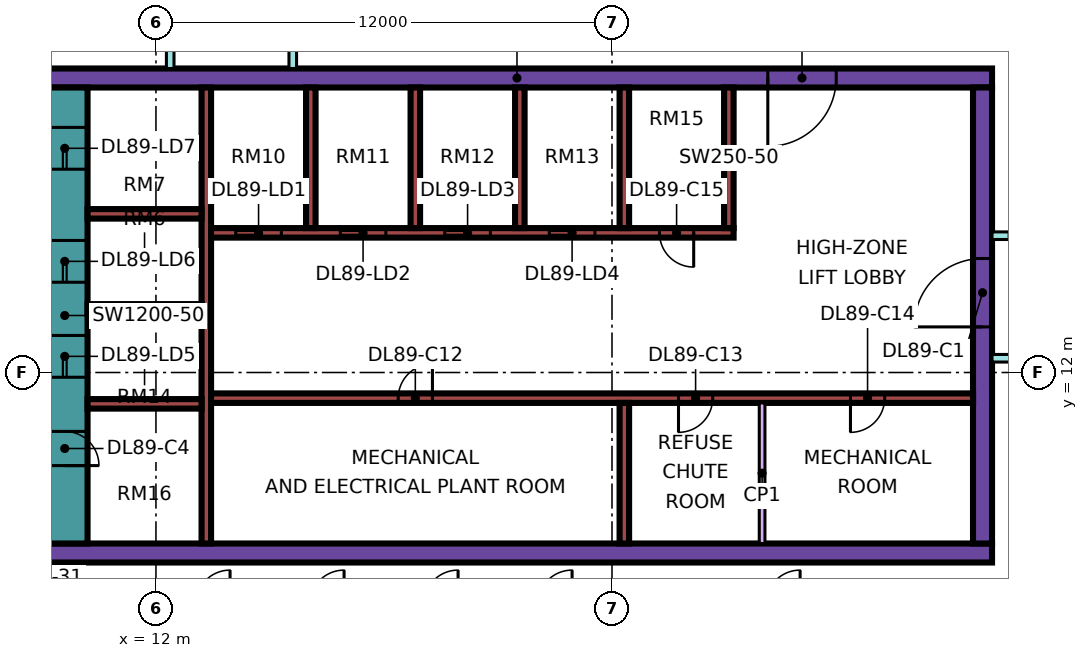
"""IFC4 building model, lengths in metres.
Left out: names, types, materials, properties, quantities, classifications, styles, units other than length and angle.
Written with IfcOpenShell. Run it as: python <this file> out.ifc"""

import sys

from ifc_helpers import new_model, si_unit, direction, frame, frame_2d, origin, place, context, subcontext, project, spatial, rectangle, extrude, element, fill, save


model = new_model("IFC4")
c1 = context("Model", 3, precision=1e-05, world=origin(), true_north=direction((0.0, 1.0)))
c2 = subcontext(c1, "Body", "Model", "MODEL_VIEW")
j1 = project(units=[si_unit("LENGTHUNIT", "METRE"), si_unit("PLANEANGLEUNIT", "RADIAN")], contexts=[c1])
p1 = place(None, origin())
s1 = spatial("IfcSite", under=j1, at=p1, CompositionType="ELEMENT")
p2 = place(p1, origin())
s2 = spatial("IfcBuilding", under=s1, at=p2, CompositionType="ELEMENT")
p3 = place(p2, frame((0.0, 0.0, 380.15)))
s3 = spatial("IfcBuildingStorey", under=s2, at=p3, CompositionType="ELEMENT", Elevation=380.15)
p4 = place(p3, frame((9.0, 7.25, 0.0), z_axis=(0.0, 0.0, 1.0), x_axis=(1.0, 0.0, 0.0)))
e1 = element("IfcWall", 1, at=p4, inside=s3, PredefinedType="SHEAR", context=c2, shape_type="SweptSolid", body=[
    extrude(rectangle(XDim=25.0, YDim=0.5, at=frame_2d((12.5, 0.0))), origin(), (0.0, 0.0, 1.0), 3.75),
])
p5 = place(p3, frame((9.0, 19.75, 0.0), z_axis=(0.0, 0.0, 1.0), x_axis=(1.0, 0.0, 0.0)))
e2 = element("IfcWall", 2, at=p5, inside=s3, PredefinedType="SHEAR", context=c2, shape_type="SweptSolid", body=[
    extrude(rectangle(XDim=25.0, YDim=0.5, at=frame_2d((12.5, 0.0))), origin(), (0.0, 0.0, 1.0), 3.75),
])
p6 = place(p5, frame((19.1, 0.0, 0.0)))
e3 = element("IfcOpeningElement", 3, at=p6, cuts=e2, PredefinedType="OPENING", context=c2, shape_type="SweptSolid", body=[
    extrude(rectangle(XDim=1.8, YDim=2.4, at=frame_2d((0.9, 1.2))), frame((0.0, 0.26, 0.0), z_axis=(0.0, -1.0, 0.0), x_axis=(1.0, 0.0, 0.0)), (0.0, 0.0, 1.0), 0.52),
])
p7 = place(p3, frame((9.6, 7.5, 0.0), z_axis=(0.0, 0.0, 1.0), x_axis=(0.0, 1.0, 0.0)))
e4 = element("IfcWall", 4, at=p7, inside=s3, PredefinedType="SHEAR", context=c2, shape_type="SweptSolid", body=[
    extrude(rectangle(XDim=12.0, YDim=1.2, at=frame_2d((6.0, 0.0))), origin(), (0.0, 0.0, 1.0), 3.75),
])
p8 = place(p7, frame((4.375, 0.0, 0.0)))
e5 = element("IfcOpeningElement", 5, at=p8, cuts=e4, PredefinedType="OPENING", context=c2, shape_type="SweptSolid", body=[
    extrude(rectangle(XDim=1.1, YDim=2.2, at=frame_2d((0.55, 1.1))), frame((0.0, 0.61, 0.0), z_axis=(0.0, -1.0, 0.0), x_axis=(1.0, 0.0, 0.0)), (0.0, 0.0, 1.0), 1.22),
])
p9 = place(p7, frame((6.875, 0.0, 0.0)))
e6 = element("IfcOpeningElement", 6, at=p9, cuts=e4, PredefinedType="OPENING", context=c2, shape_type="SweptSolid", body=[
    extrude(rectangle(XDim=1.1, YDim=2.2, at=frame_2d((0.55, 1.1))), frame((0.0, 0.61, 0.0), z_axis=(0.0, -1.0, 0.0), x_axis=(1.0, 0.0, 0.0)), (0.0, 0.0, 1.0), 1.22),
])
p10 = place(p7, frame((9.85, 0.0, 0.0)))
e7 = element("IfcOpeningElement", 7, at=p10, cuts=e4, PredefinedType="OPENING", context=c2, shape_type="SweptSolid", body=[
    extrude(rectangle(XDim=1.1, YDim=2.2, at=frame_2d((0.55, 1.1))), frame((0.0, 0.61, 0.0), z_axis=(0.0, -1.0, 0.0), x_axis=(1.0, 0.0, 0.0)), (0.0, 0.0, 1.0), 1.22),
])
p11 = place(p7, frame((2.05, 0.0, 0.0)))
e8 = element("IfcOpeningElement", 8, at=p11, cuts=e4, PredefinedType="OPENING", context=c2, shape_type="SweptSolid", body=[
    extrude(rectangle(XDim=0.9, YDim=2.1, at=frame_2d((0.45, 1.05))), frame((0.0, 0.61, 0.0), z_axis=(0.0, -1.0, 0.0), x_axis=(1.0, 0.0, 0.0)), (0.0, 0.0, 1.0), 1.22),
])
p12 = place(p3, frame((33.75, 7.5, 0.0), z_axis=(0.0, 0.0, 1.0), x_axis=(0.0, 1.0, 0.0)))
e9 = element("IfcWall", 9, at=p12, inside=s3, PredefinedType="SHEAR", context=c2, shape_type="SweptSolid", body=[
    extrude(rectangle(XDim=12.0, YDim=0.5, at=frame_2d((6.0, 0.0))), origin(), (0.0, 0.0, 1.0), 3.75),
])
p13 = place(p12, frame((5.7, 0.0, 0.0)))
e10 = element("IfcOpeningElement", 10, at=p13, cuts=e9, PredefinedType="OPENING", context=c2, shape_type="SweptSolid", body=[
    extrude(rectangle(XDim=1.8, YDim=2.4, at=frame_2d((0.9, 1.2))), frame((0.0, 0.26, 0.0), z_axis=(0.0, -1.0, 0.0), x_axis=(1.0, 0.0, 0.0)), (0.0, 0.0, 1.0), 0.52),
])
p14 = place(p3, frame((13.325, 7.5, 0.0), z_axis=(0.0, 0.0, 1.0), x_axis=(0.0, 1.0, 0.0)))
e11 = element("IfcWall", 11, at=p14, inside=s3, PredefinedType="SHEAR", context=c2, shape_type="SweptSolid", body=[
    extrude(rectangle(XDim=12.0, YDim=0.25, at=frame_2d((6.0, 0.0))), origin(), (0.0, 0.0, 1.0), 3.75),
])
p15 = place(p3, frame((13.45, 11.325, 0.0), z_axis=(0.0, 0.0, 1.0), x_axis=(1.0, 0.0, 0.0)))
e12 = element("IfcWall", 12, at=p15, inside=s3, PredefinedType="SHEAR", context=c2, shape_type="SweptSolid", body=[
    extrude(rectangle(XDim=20.05, YDim=0.25, at=frame_2d((10.025, 0.0))), origin(), (0.0, 0.0, 1.0), 3.75),
])
p16 = place(p15, frame((4.925, 0.0, 0.0)))
e13 = element("IfcOpeningElement", 13, at=p16, cuts=e12, PredefinedType="OPENING", context=c2, shape_type="SweptSolid", body=[
    extrude(rectangle(XDim=0.9, YDim=2.1, at=frame_2d((0.45, 1.05))), frame((0.0, 0.135, 0.0), z_axis=(0.0, -1.0, 0.0), x_axis=(1.0, 0.0, 0.0)), (0.0, 0.0, 1.0), 0.27),
])
p17 = place(p15, frame((12.3, 0.0, 0.0)))
e14 = element("IfcOpeningElement", 14, at=p17, cuts=e12, PredefinedType="OPENING", context=c2, shape_type="SweptSolid", body=[
    extrude(rectangle(XDim=0.9, YDim=2.1, at=frame_2d((0.45, 1.05))), frame((0.0, 0.135, 0.0), z_axis=(0.0, -1.0, 0.0), x_axis=(1.0, 0.0, 0.0)), (0.0, 0.0, 1.0), 0.27),
])
p18 = place(p15, frame((16.825, 0.0, 0.0)))
e15 = element("IfcOpeningElement", 15, at=p18, cuts=e12, PredefinedType="OPENING", context=c2, shape_type="SweptSolid", body=[
    extrude(rectangle(XDim=0.9, YDim=2.1, at=frame_2d((0.45, 1.05))), frame((0.0, 0.135, 0.0), z_axis=(0.0, -1.0, 0.0), x_axis=(1.0, 0.0, 0.0)), (0.0, 0.0, 1.0), 0.27),
])
p19 = place(p3, frame((13.45, 15.675, 0.0), z_axis=(0.0, 0.0, 1.0), x_axis=(1.0, 0.0, 0.0)))
e16 = element("IfcWall", 16, at=p19, inside=s3, PredefinedType="SHEAR", context=c2, shape_type="SweptSolid", body=[
    extrude(rectangle(XDim=13.75, YDim=0.25, at=frame_2d((6.875, 0.0))), origin(), (0.0, 0.0, 1.0), 3.75),
])
p20 = place(p19, frame((0.65, 0.0, 0.0)))
e17 = element("IfcOpeningElement", 17, at=p20, cuts=e16, PredefinedType="OPENING", context=c2, shape_type="SweptSolid", body=[
    extrude(rectangle(XDim=1.2, YDim=2.2, at=frame_2d((0.6, 1.1))), frame((0.0, 0.135, 0.0), z_axis=(0.0, -1.0, 0.0), x_axis=(1.0, 0.0, 0.0)), (0.0, 0.0, 1.0), 0.27),
])
p21 = place(p19, frame((3.4, 0.0, 0.0)))
e18 = element("IfcOpeningElement", 18, at=p21, cuts=e16, PredefinedType="OPENING", context=c2, shape_type="SweptSolid", body=[
    extrude(rectangle(XDim=1.2, YDim=2.2, at=frame_2d((0.6, 1.1))), frame((0.0, 0.135, 0.0), z_axis=(0.0, -1.0, 0.0), x_axis=(1.0, 0.0, 0.0)), (0.0, 0.0, 1.0), 0.27),
])
p22 = place(p19, frame((6.15, 0.0, 0.0)))
e19 = element("IfcOpeningElement", 19, at=p22, cuts=e16, PredefinedType="OPENING", context=c2, shape_type="SweptSolid", body=[
    extrude(rectangle(XDim=1.2, YDim=2.2, at=frame_2d((0.6, 1.1))), frame((0.0, 0.135, 0.0), z_axis=(0.0, -1.0, 0.0), x_axis=(1.0, 0.0, 0.0)), (0.0, 0.0, 1.0), 0.27),
])
p23 = place(p19, frame((8.9, 0.0, 0.0)))
e20 = element("IfcOpeningElement", 20, at=p23, cuts=e16, PredefinedType="OPENING", context=c2, shape_type="SweptSolid", body=[
    extrude(rectangle(XDim=1.2, YDim=2.2, at=frame_2d((0.6, 1.1))), frame((0.0, 0.135, 0.0), z_axis=(0.0, -1.0, 0.0), x_axis=(1.0, 0.0, 0.0)), (0.0, 0.0, 1.0), 0.27),
])
p24 = place(p19, frame((11.8, 0.0, 0.0)))
e21 = element("IfcOpeningElement", 21, at=p24, cuts=e16, PredefinedType="OPENING", context=c2, shape_type="SweptSolid", body=[
    extrude(rectangle(XDim=0.9, YDim=2.1, at=frame_2d((0.45, 1.05))), frame((0.0, 0.135, 0.0), z_axis=(0.0, -1.0, 0.0), x_axis=(1.0, 0.0, 0.0)), (0.0, 0.0, 1.0), 0.27),
])
for number, where, z_axis, x_axis in (
    (22, (10.2, 11.175, 0.0), (0.0, 0.0, 1.0), (1.0, 0.0, 0.0)),
    (23, (10.2, 13.675, 0.0), (0.0, 0.0, 1.0), (1.0, 0.0, 0.0)),
    (24, (10.2, 16.175, 0.0), (0.0, 0.0, 1.0), (1.0, 0.0, 0.0)),
):
    element("IfcWall", number, at=place(p3, frame(where, z_axis=z_axis, x_axis=x_axis)), inside=s3, PredefinedType="SHEAR", context=c2, shape_type="SweptSolid", body=[
        extrude(rectangle(XDim=3.0, YDim=0.25, at=frame_2d((1.5, 0.0))), origin(), (0.0, 0.0, 1.0), 3.75),
    ])
for number, where, z_axis, x_axis in (
    (25, (24.325, 7.5, 0.0), (0.0, 0.0, 1.0), (0.0, 1.0, 0.0)),
    (26, (16.075, 15.8, 0.0), (0.0, 0.0, 1.0), (0.0, 1.0, 0.0)),
    (27, (18.825, 15.8, 0.0), (0.0, 0.0, 1.0), (0.0, 1.0, 0.0)),
    (28, (21.575, 15.8, 0.0), (0.0, 0.0, 1.0), (0.0, 1.0, 0.0)),
    (29, (24.325, 15.8, 0.0), (0.0, 0.0, 1.0), (0.0, 1.0, 0.0)),
    (30, (27.075, 15.8, 0.0), (0.0, 0.0, 1.0), (0.0, 1.0, 0.0)),
):
    element("IfcWall", number, at=place(p3, frame(where, z_axis=z_axis, x_axis=x_axis)), inside=s3, PredefinedType="SHEAR", context=c2, shape_type="SweptSolid", body=[
        extrude(rectangle(XDim=3.7, YDim=0.25, at=frame_2d((1.85, 0.0))), origin(), (0.0, 0.0, 1.0), 3.75),
    ])
p25 = place(p3, frame((-1.447, 12.553, 0.0), z_axis=(0.0, 0.0, 1.0), x_axis=(0.707106781187, -0.707106781187, 0.0)))
e31 = element("IfcWall", 31, at=p25, inside=s3, PredefinedType="SOLIDWALL", context=c2, shape_type="SweptSolid", body=[
    extrude(rectangle(XDim=19.799, YDim=0.15, at=frame_2d((9.899, 0.0))), origin(), (0.0, 0.0, 1.0), 3.3),
])
p26 = place(p25, frame((2.212, 0.0, 0.45)))
e32 = element("IfcOpeningElement", 32, at=p26, cuts=e31, PredefinedType="OPENING", context=c2, shape_type="SweptSolid", body=[
    extrude(rectangle(XDim=3.0, YDim=2.0, at=frame_2d((1.5, 1.0))), frame((0.0, 0.085, 0.0), z_axis=(0.0, -1.0, 0.0), x_axis=(1.0, 0.0, 0.0)), (0.0, 0.0, 1.0), 0.17),
])
p27 = place(p25, frame((10.216, 0.0, 0.45)))
e33 = element("IfcOpeningElement", 33, at=p27, cuts=e31, PredefinedType="OPENING", context=c2, shape_type="SweptSolid", body=[
    extrude(rectangle(XDim=3.0, YDim=2.0, at=frame_2d((1.5, 1.0))), frame((0.0, 0.085, 0.0), z_axis=(0.0, -1.0, 0.0), x_axis=(1.0, 0.0, 0.0)), (0.0, 0.0, 1.0), 0.17),
])
p28 = place(p3, frame((27.95, 7.5, 0.0), z_axis=(0.0, 0.0, 1.0), x_axis=(0.0, 1.0, 0.0)))
e34 = element("IfcWall", 34, at=p28, inside=s3, PredefinedType="PARTITIONING", context=c2, shape_type="SweptSolid", body=[
    extrude(rectangle(XDim=3.7, YDim=0.15, at=frame_2d((1.85, 0.0))), origin(), (0.0, 0.0, 1.0), 3.3),
])
p29 = place(p3, frame((15.6, 20.0, 0.0), z_axis=(0.0, 0.0, 1.0), x_axis=(0.0, 1.0, 0.0)))
e35 = element("IfcWall", 35, at=p29, inside=s3, PredefinedType="PARTITIONING", context=c2, shape_type="SweptSolid", body=[
    extrude(rectangle(XDim=27.775, YDim=0.2, at=frame_2d((13.887, 0.0))), origin(), (0.0, 0.0, 1.0), 3.3),
])
p30 = place(p29, frame((7.15, 0.0, 0.0)))
e36 = element("IfcOpeningElement", 36, at=p30, cuts=e35, PredefinedType="OPENING", context=c2, shape_type="SweptSolid", body=[
    extrude(rectangle(XDim=1.6, YDim=2.1, at=frame_2d((0.8, 1.05))), frame((0.0, 0.11, 0.0), z_axis=(0.0, -1.0, 0.0), x_axis=(1.0, 0.0, 0.0)), (0.0, 0.0, 1.0), 0.22),
])
p31 = place(p29, frame((13.5, 0.0, 0.0)))
e37 = element("IfcOpeningElement", 37, at=p31, cuts=e35, PredefinedType="OPENING", context=c2, shape_type="SweptSolid", body=[
    extrude(rectangle(XDim=1.0, YDim=2.1, at=frame_2d((0.5, 1.05))), frame((0.0, 0.11, 0.0), z_axis=(0.0, -1.0, 0.0), x_axis=(1.0, 0.0, 0.0)), (0.0, 0.0, 1.0), 0.22),
])
p32 = place(p29, frame((22.9, 0.0, 0.0)))
e38 = element("IfcOpeningElement", 38, at=p32, cuts=e35, PredefinedType="OPENING", context=c2, shape_type="SweptSolid", body=[
    extrude(rectangle(XDim=1.0, YDim=2.1, at=frame_2d((0.5, 1.05))), frame((0.0, 0.11, 0.0), z_axis=(0.0, -1.0, 0.0), x_axis=(1.0, 0.0, 0.0)), (0.0, 0.0, 1.0), 0.22),
])
p33 = place(p29, frame((1.15, 0.0, 0.0)))
e39 = element("IfcOpeningElement", 39, at=p33, cuts=e35, PredefinedType="OPENING", context=c2, shape_type="SweptSolid", body=[
    extrude(rectangle(XDim=1.8, YDim=2.1, at=frame_2d((0.9, 1.05))), frame((0.0, 0.11, 0.0), z_axis=(0.0, -1.0, 0.0), x_axis=(1.0, 0.0, 0.0)), (0.0, 0.0, 1.0), 0.22),
])
p34 = place(p29, frame((25.9, 0.0, 0.0)))
e40 = element("IfcOpeningElement", 40, at=p34, cuts=e35, PredefinedType="OPENING", context=c2, shape_type="SweptSolid", body=[
    extrude(rectangle(XDim=1.0, YDim=2.1, at=frame_2d((0.5, 1.05))), frame((0.0, 0.11, 0.0), z_axis=(0.0, -1.0, 0.0), x_axis=(1.0, 0.0, 0.0)), (0.0, 0.0, 1.0), 0.22),
])
p35 = place(p3, frame((34.0, 12.375, 0.0), z_axis=(0.0, 0.0, 1.0), x_axis=(1.0, 0.0, 0.0)))
e41 = element("IfcWall", 41, at=p35, inside=s3, PredefinedType="PARTITIONING", context=c2, shape_type="SweptSolid", body=[
    extrude(rectangle(XDim=2.376, YDim=0.2, at=frame_2d((1.188, 0.0))), origin(), (0.0, 0.0, 1.0), 3.3),
])
p36 = place(p3, frame((34.0, 15.6, 0.0), z_axis=(0.0, 0.0, 1.0), x_axis=(1.0, 0.0, 0.0)))
e42 = element("IfcWall", 42, at=p36, inside=s3, PredefinedType="PARTITIONING", context=c2, shape_type="SweptSolid", body=[
    extrude(rectangle(XDim=10.35, YDim=0.2, at=frame_2d((5.175, 0.0))), origin(), (0.0, 0.0, 1.0), 3.3),
])
p37 = place(p36, frame((5.6, 0.0, 0.0)))
e43 = element("IfcOpeningElement", 43, at=p37, cuts=e42, PredefinedType="OPENING", context=c2, shape_type="SweptSolid", body=[
    extrude(rectangle(XDim=1.0, YDim=2.1, at=frame_2d((0.5, 1.05))), frame((0.0, 0.11, 0.0), z_axis=(0.0, -1.0, 0.0), x_axis=(1.0, 0.0, 0.0)), (0.0, 0.0, 1.0), 0.22),
])
p38 = place(p36, frame((0.45, 0.0, 0.0)))
e44 = element("IfcOpeningElement", 44, at=p38, cuts=e42, PredefinedType="OPENING", context=c2, shape_type="SweptSolid", body=[
    extrude(rectangle(XDim=1.2, YDim=2.1, at=frame_2d((0.6, 1.05))), frame((0.0, 0.11, 0.0), z_axis=(0.0, -1.0, 0.0), x_axis=(1.0, 0.0, 0.0)), (0.0, 0.0, 1.0), 0.22),
])
p39 = place(p3, frame((12.375, 20.0, 0.0), z_axis=(0.0, 0.0, 1.0), x_axis=(0.0, 1.0, 0.0)))
e45 = element("IfcWall", 45, at=p39, inside=s3, PredefinedType="PARTITIONING", context=c2, shape_type="SweptSolid", body=[
    extrude(rectangle(XDim=4.375, YDim=0.2, at=frame_2d((2.188, 0.0))), origin(), (0.0, 0.0, 1.0), 3.3),
])
p40 = place(p39, frame((0.6, 0.0, 0.0)))
e46 = element("IfcOpeningElement", 46, at=p40, cuts=e45, PredefinedType="OPENING", context=c2, shape_type="SweptSolid", body=[
    extrude(rectangle(XDim=1.2, YDim=2.1, at=frame_2d((0.6, 1.05))), frame((0.0, 0.11, 0.0), z_axis=(0.0, -1.0, 0.0), x_axis=(1.0, 0.0, 0.0)), (0.0, 0.0, 1.0), 0.22),
])
p41 = place(p20, origin())
e47 = element("IfcDoor", 47, at=p41, inside=s3, OperationType="DOUBLE_DOOR_SLIDING", PredefinedType="DOOR", context=c2, shape_type="SweptSolid", body=[
    extrude(rectangle(XDim=1.2, YDim=2.2, at=frame_2d((0.6, 1.1))), frame((0.0, 0.025, 0.0), z_axis=(0.0, -1.0, 0.0), x_axis=(1.0, 0.0, 0.0)), (0.0, 0.0, 1.0), 0.05),
])
fill(e17, e47)
p42 = place(p21, origin())
e48 = element("IfcDoor", 48, at=p42, inside=s3, OperationType="DOUBLE_DOOR_SLIDING", PredefinedType="DOOR", context=c2, shape_type="SweptSolid", body=[
    extrude(rectangle(XDim=1.2, YDim=2.2, at=frame_2d((0.6, 1.1))), frame((0.0, 0.025, 0.0), z_axis=(0.0, -1.0, 0.0), x_axis=(1.0, 0.0, 0.0)), (0.0, 0.0, 1.0), 0.05),
])
fill(e18, e48)
p43 = place(p22, origin())
e49 = element("IfcDoor", 49, at=p43, inside=s3, OperationType="DOUBLE_DOOR_SLIDING", PredefinedType="DOOR", context=c2, shape_type="SweptSolid", body=[
    extrude(rectangle(XDim=1.2, YDim=2.2, at=frame_2d((0.6, 1.1))), frame((0.0, 0.025, 0.0), z_axis=(0.0, -1.0, 0.0), x_axis=(1.0, 0.0, 0.0)), (0.0, 0.0, 1.0), 0.05),
])
fill(e19, e49)
p44 = place(p23, origin())
e50 = element("IfcDoor", 50, at=p44, inside=s3, OperationType="DOUBLE_DOOR_SLIDING", PredefinedType="DOOR", context=c2, shape_type="SweptSolid", body=[
    extrude(rectangle(XDim=1.2, YDim=2.2, at=frame_2d((0.6, 1.1))), frame((0.0, 0.025, 0.0), z_axis=(0.0, -1.0, 0.0), x_axis=(1.0, 0.0, 0.0)), (0.0, 0.0, 1.0), 0.05),
])
fill(e20, e50)
p45 = place(p8, origin())
e51 = element("IfcDoor", 51, at=p45, inside=s3, OperationType="DOUBLE_DOOR_SLIDING", PredefinedType="DOOR", context=c2, shape_type="SweptSolid", body=[
    extrude(rectangle(XDim=1.1, YDim=2.2, at=frame_2d((0.55, 1.1))), frame((0.0, 0.025, 0.0), z_axis=(0.0, -1.0, 0.0), x_axis=(1.0, 0.0, 0.0)), (0.0, 0.0, 1.0), 0.05),
])
fill(e5, e51)
p46 = place(p9, origin())
e52 = element("IfcDoor", 52, at=p46, inside=s3, OperationType="DOUBLE_DOOR_SLIDING", PredefinedType="DOOR", context=c2, shape_type="SweptSolid", body=[
    extrude(rectangle(XDim=1.1, YDim=2.2, at=frame_2d((0.55, 1.1))), frame((0.0, 0.025, 0.0), z_axis=(0.0, -1.0, 0.0), x_axis=(1.0, 0.0, 0.0)), (0.0, 0.0, 1.0), 0.05),
])
fill(e6, e52)
p47 = place(p10, origin())
e53 = element("IfcDoor", 53, at=p47, inside=s3, OperationType="DOUBLE_DOOR_SLIDING", PredefinedType="DOOR", context=c2, shape_type="SweptSolid", body=[
    extrude(rectangle(XDim=1.1, YDim=2.2, at=frame_2d((0.55, 1.1))), frame((0.0, 0.025, 0.0), z_axis=(0.0, -1.0, 0.0), x_axis=(1.0, 0.0, 0.0)), (0.0, 0.0, 1.0), 0.05),
])
fill(e7, e53)
p48 = place(p13, origin())
e54 = element("IfcDoor", 54, at=p48, inside=s3, OperationType="DOUBLE_DOOR_SINGLE_SWING", PredefinedType="DOOR", context=c2, shape_type="SweptSolid", body=[
    extrude(rectangle(XDim=1.8, YDim=2.4, at=frame_2d((0.9, 1.2))), frame((0.0, 0.025, 0.0), z_axis=(0.0, -1.0, 0.0), x_axis=(1.0, 0.0, 0.0)), (0.0, 0.0, 1.0), 0.05),
])
fill(e10, e54)
p49 = place(p6, frame((1.8, 0.0, 0.0), z_axis=(0.0, 0.0, 1.0), x_axis=(-1.0, 0.0, 0.0)))
e55 = element("IfcDoor", 55, at=p49, inside=s3, OperationType="DOUBLE_DOOR_SINGLE_SWING", PredefinedType="DOOR", context=c2, shape_type="SweptSolid", body=[
    extrude(rectangle(XDim=1.8, YDim=2.4, at=frame_2d((0.9, 1.2))), frame((0.0, 0.025, 0.0), z_axis=(0.0, -1.0, 0.0), x_axis=(1.0, 0.0, 0.0)), (0.0, 0.0, 1.0), 0.05),
])
fill(e3, e55)
p50 = place(p11, frame((0.9, 0.0, 0.0), z_axis=(0.0, 0.0, 1.0), x_axis=(-1.0, 0.0, 0.0)))
e56 = element("IfcDoor", 56, at=p50, inside=s3, OperationType="SINGLE_SWING_LEFT", PredefinedType="DOOR", context=c2, shape_type="SweptSolid", body=[
    extrude(rectangle(XDim=0.9, YDim=2.1, at=frame_2d((0.45, 1.05))), frame((0.0, 0.025, 0.0), z_axis=(0.0, -1.0, 0.0), x_axis=(1.0, 0.0, 0.0)), (0.0, 0.0, 1.0), 0.05),
])
fill(e8, e56)
p51 = place(p16, frame((0.9, 0.0, 0.0), z_axis=(0.0, 0.0, 1.0), x_axis=(-1.0, 0.0, 0.0)))
e57 = element("IfcDoor", 57, at=p51, inside=s3, OperationType="SINGLE_SWING_RIGHT", PredefinedType="DOOR", context=c2, shape_type="SweptSolid", body=[
    extrude(rectangle(XDim=0.9, YDim=2.1, at=frame_2d((0.45, 1.05))), frame((0.0, 0.025, 0.0), z_axis=(0.0, -1.0, 0.0), x_axis=(1.0, 0.0, 0.0)), (0.0, 0.0, 1.0), 0.05),
])
fill(e13, e57)
p52 = place(p17, frame((0.9, 0.0, 0.0), z_axis=(0.0, 0.0, 1.0), x_axis=(-1.0, 0.0, 0.0)))
e58 = element("IfcDoor", 58, at=p52, inside=s3, OperationType="SINGLE_SWING_LEFT", PredefinedType="DOOR", context=c2, shape_type="SweptSolid", body=[
    extrude(rectangle(XDim=0.9, YDim=2.1, at=frame_2d((0.45, 1.05))), frame((0.0, 0.025, 0.0), z_axis=(0.0, -1.0, 0.0), x_axis=(1.0, 0.0, 0.0)), (0.0, 0.0, 1.0), 0.05),
])
fill(e14, e58)
p53 = place(p18, frame((0.9, 0.0, 0.0), z_axis=(0.0, 0.0, 1.0), x_axis=(-1.0, 0.0, 0.0)))
e59 = element("IfcDoor", 59, at=p53, inside=s3, OperationType="SINGLE_SWING_LEFT", PredefinedType="DOOR", context=c2, shape_type="SweptSolid", body=[
    extrude(rectangle(XDim=0.9, YDim=2.1, at=frame_2d((0.45, 1.05))), frame((0.0, 0.025, 0.0), z_axis=(0.0, -1.0, 0.0), x_axis=(1.0, 0.0, 0.0)), (0.0, 0.0, 1.0), 0.05),
])
fill(e15, e59)
p54 = place(p24, origin())
e60 = element("IfcDoor", 60, at=p54, inside=s3, OperationType="SINGLE_SWING_RIGHT", PredefinedType="DOOR", context=c2, shape_type="SweptSolid", body=[
    extrude(rectangle(XDim=0.9, YDim=2.1, at=frame_2d((0.45, 1.05))), frame((0.0, 0.025, 0.0), z_axis=(0.0, -1.0, 0.0), x_axis=(1.0, 0.0, 0.0)), (0.0, 0.0, 1.0), 0.05),
])
fill(e21, e60)
save(model, sys.argv[1])
